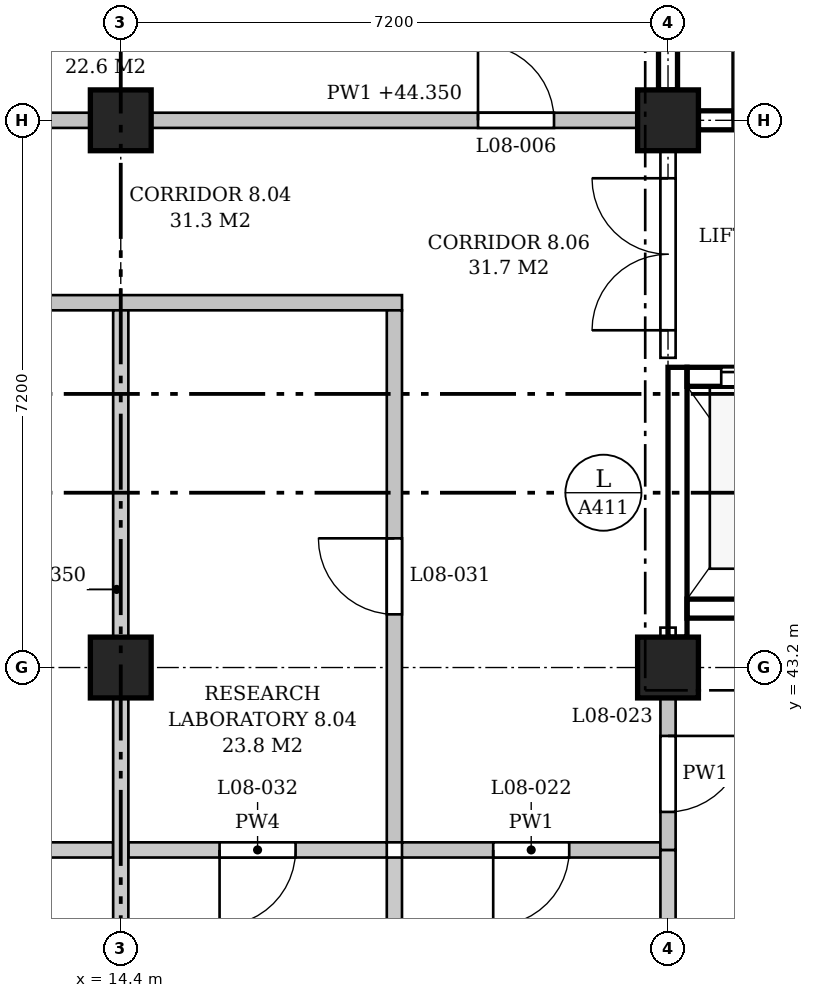
"""IFC4 building model, lengths in metres.
Left out: names, types, materials, properties, quantities, classifications, styles, units other than length and angle.
Written with IfcOpenShell. Run it as: python <this file> out.ifc"""

import sys

from ifc_helpers import new_model, si_unit, direction, frame, frame_2d, origin, origin_2d, place, context, subcontext, project, spatial, polyline, rectangle, outline, extrude, element, fill, save


model = new_model("IFC4")
c1 = context("Model", 3, precision=1e-05, world=origin(), true_north=direction((0.0, 1.0)))
c2 = subcontext(c1, "Body", "Model", "MODEL_VIEW")
j1 = project(units=[si_unit("LENGTHUNIT", "METRE"), si_unit("PLANEANGLEUNIT", "RADIAN")], contexts=[c1])
p1 = place(None, origin())
s1 = spatial("IfcSite", under=j1, at=p1, CompositionType="ELEMENT")
p2 = place(p1, origin())
s2 = spatial("IfcBuilding", under=s1, at=p2, CompositionType="ELEMENT")
p3 = place(p2, frame((0.0, 0.0, 40.8)))
s3 = spatial("IfcBuildingStorey", under=s2, at=p3, CompositionType="ELEMENT", Elevation=40.8)
for number, where, z_axis, x_axis in (
    (1, (14.4, 43.2, 0.0), (0.0, 0.0, 1.0), (1.0, 0.0, 0.0)),
    (2, (14.4, 50.4, 0.0), (0.0, 0.0, 1.0), (1.0, 0.0, 0.0)),
    (3, (21.6, 43.2, 0.0), (0.0, 0.0, 1.0), (1.0, 0.0, 0.0)),
    (4, (21.6, 50.4, 0.0), (0.0, 0.0, 1.0), (1.0, 0.0, 0.0)),
):
    element("IfcColumn", number, at=place(p3, frame(where, z_axis=z_axis, x_axis=x_axis)), inside=s3, PredefinedType="COLUMN", context=c2, shape_type="SweptSolid", body=[
        extrude(rectangle(XDim=0.8, YDim=0.8, at=origin_2d()), origin(), (0.0, 0.0, 1.0), 4.5),
    ])
p4 = place(p3, frame((22.0, 50.4, 0.0), z_axis=(0.0, 0.0, 1.0), x_axis=(1.0, 0.0, 0.0)))
e5 = element("IfcWall", 5, at=p4, inside=s3, PredefinedType="SHEAR", context=c2, shape_type="SweptSolid", body=[
    extrude(rectangle(XDim=6.4, YDim=0.25, at=frame_2d((3.2, 0.0))), origin(), (0.0, 0.0, 1.0), 3.55),
])
p5 = place(p4, frame((0.45, 0.0, 0.0)))
e6 = element("IfcOpeningElement", 6, at=p5, cuts=e5, PredefinedType="OPENING", context=c2, shape_type="SweptSolid", body=[
    extrude(rectangle(XDim=1.1, YDim=2.1, at=frame_2d((0.55, 1.05))), frame((0.0, 0.135, 0.0), z_axis=(0.0, -1.0, 0.0), x_axis=(1.0, 0.0, 0.0)), (0.0, 0.0, 1.0), 0.27),
])
p6 = place(p3, frame((21.6, 50.8, 0.0), z_axis=(0.0, 0.0, 1.0), x_axis=(0.0, 1.0, 0.0)))
e7 = element("IfcWall", 7, at=p6, inside=s3, PredefinedType="SHEAR", context=c2, shape_type="SweptSolid", body=[
    extrude(rectangle(XDim=6.4, YDim=0.25, at=frame_2d((3.2, 0.0))), origin(), (0.0, 0.0, 1.0), 3.55),
])
p7 = place(p3, frame((21.725, 43.6, -0.25), z_axis=(0.0, 0.0, 1.0), x_axis=(0.0, 1.0, 0.0)))
e8 = element("IfcWall", 8, at=p7, inside=s3, PredefinedType="SHEAR", context=c2, shape_type="SweptSolid", body=[
    extrude(rectangle(XDim=3.55, YDim=0.25, at=frame_2d((1.775, 0.0))), origin(), (0.0, 0.0, 1.0), 3.8),
])
p8 = place(p3, frame((21.85, 47.025, -0.25), z_axis=(0.0, 0.0, 1.0), x_axis=(1.0, 0.0, 0.0)))
e9 = element("IfcWall", 9, at=p8, inside=s3, PredefinedType="SHEAR", context=c2, shape_type="SweptSolid", body=[
    extrude(rectangle(XDim=2.0, YDim=0.25, at=frame_2d((1.0, 0.0))), origin(), (0.0, 0.0, 1.0), 4.5),
])
p9 = place(p8, frame((0.45, 0.0, 0.25)))
e10 = element("IfcOpeningElement", 10, at=p9, cuts=e9, PredefinedType="OPENING", context=c2, shape_type="SweptSolid", body=[
    extrude(rectangle(XDim=1.1, YDim=2.1, at=frame_2d((0.55, 1.05))), frame((0.0, 0.135, 0.0), z_axis=(0.0, -1.0, 0.0), x_axis=(1.0, 0.0, 0.0)), (0.0, 0.0, 1.0), 0.27),
])
p10 = place(p3, frame((21.85, 43.975, -0.25), z_axis=(0.0, 0.0, 1.0), x_axis=(1.0, 0.0, 0.0)))
e11 = element("IfcWall", 11, at=p10, inside=s3, PredefinedType="SHEAR", context=c2, shape_type="SweptSolid", body=[
    extrude(rectangle(XDim=2.0, YDim=0.25, at=frame_2d((1.0, 0.0))), origin(), (0.0, 0.0, 1.0), 4.5),
])
p11 = place(p3, frame((7.3, 40.8, 0.0), z_axis=(0.0, 0.0, 1.0), x_axis=(1.0, 0.0, 0.0)))
e12 = element("IfcWall", 12, at=p11, inside=s3, PredefinedType="PARTITIONING", context=c2, shape_type="SweptSolid", body=[
    extrude(outline(polyline([(0.0, 0.0), (7.0, 0.0), (7.0, 3.55), (6.875, 3.55), (6.875, 4.25), (0.125, 4.25), (0.125, 3.55), (0.0, 3.55), (0.0, 0.0)])), frame((0.0, 0.1, 0.0), z_axis=(0.0, -1.0, 0.0), x_axis=(1.0, 0.0, 0.0)), (0.0, 0.0, 1.0), 0.2),
])
p12 = place(p11, frame((1.25, 0.0, 0.0)))
e13 = element("IfcOpeningElement", 13, at=p12, cuts=e12, PredefinedType="OPENING", context=c2, shape_type="SweptSolid", body=[
    extrude(rectangle(XDim=1.0, YDim=2.1, at=frame_2d((0.5, 1.05))), frame((0.0, 0.11, 0.0), z_axis=(0.0, -1.0, 0.0), x_axis=(1.0, 0.0, 0.0)), (0.0, 0.0, 1.0), 0.22),
])
p13 = place(p11, frame((4.75, 0.0, 0.0)))
e14 = element("IfcOpeningElement", 14, at=p13, cuts=e12, PredefinedType="OPENING", context=c2, shape_type="SweptSolid", body=[
    extrude(rectangle(XDim=1.0, YDim=2.1, at=frame_2d((0.5, 1.05))), frame((0.0, 0.11, 0.0), z_axis=(0.0, -1.0, 0.0), x_axis=(1.0, 0.0, 0.0)), (0.0, 0.0, 1.0), 0.22),
])
p14 = place(p3, frame((14.5, 40.8, 0.0), z_axis=(0.0, 0.0, 1.0), x_axis=(1.0, 0.0, 0.0)))
e15 = element("IfcWall", 15, at=p14, inside=s3, PredefinedType="PARTITIONING", context=c2, shape_type="SweptSolid", body=[
    extrude(outline(polyline([(0.0, 0.0), (3.4, 0.0), (3.4, 4.25), (0.125, 4.25), (0.125, 3.55), (0.0, 3.55), (0.0, 0.0)])), frame((0.0, 0.1, 0.0), z_axis=(0.0, -1.0, 0.0), x_axis=(1.0, 0.0, 0.0)), (0.0, 0.0, 1.0), 0.2),
])
p15 = place(p14, frame((1.2, 0.0, 0.0)))
e16 = element("IfcOpeningElement", 16, at=p15, cuts=e15, PredefinedType="OPENING", context=c2, shape_type="SweptSolid", body=[
    extrude(rectangle(XDim=1.0, YDim=2.1, at=frame_2d((0.5, 1.05))), frame((0.0, 0.11, 0.0), z_axis=(0.0, -1.0, 0.0), x_axis=(1.0, 0.0, 0.0)), (0.0, 0.0, 1.0), 0.22),
])
p16 = place(p3, frame((18.1, 40.8, 0.0), z_axis=(0.0, 0.0, 1.0), x_axis=(1.0, 0.0, 0.0)))
e17 = element("IfcWall", 17, at=p16, inside=s3, PredefinedType="PARTITIONING", context=c2, shape_type="SweptSolid", body=[
    extrude(outline(polyline([(0.0, 0.0), (3.4, 0.0), (3.4, 3.55), (3.275, 3.55), (3.275, 4.25), (0.0, 4.25), (0.0, 0.0)])), frame((0.0, 0.1, 0.0), z_axis=(0.0, -1.0, 0.0), x_axis=(1.0, 0.0, 0.0)), (0.0, 0.0, 1.0), 0.2),
])
p17 = place(p16, frame((1.2, 0.0, 0.0)))
e18 = element("IfcOpeningElement", 18, at=p17, cuts=e17, PredefinedType="OPENING", context=c2, shape_type="SweptSolid", body=[
    extrude(rectangle(XDim=1.0, YDim=2.1, at=frame_2d((0.5, 1.05))), frame((0.0, 0.11, 0.0), z_axis=(0.0, -1.0, 0.0), x_axis=(1.0, 0.0, 0.0)), (0.0, 0.0, 1.0), 0.22),
])
p18 = place(p3, frame((3.5, 48.0, 0.0), z_axis=(0.0, 0.0, 1.0), x_axis=(1.0, 0.0, 0.0)))
e19 = element("IfcWall", 19, at=p18, inside=s3, PredefinedType="PARTITIONING", context=c2, shape_type="SweptSolid", body=[
    extrude(outline(polyline([(0.0, 0.0), (14.6, 0.0), (14.6, 4.25), (11.125, 4.25), (11.125, 3.55), (10.675, 3.55), (10.675, 4.25), (3.925, 4.25), (3.925, 3.55), (3.475, 3.55), (3.475, 4.25), (0.0, 4.25), (0.0, 0.0)])), frame((0.0, 0.1, 0.0), z_axis=(0.0, -1.0, 0.0), x_axis=(1.0, 0.0, 0.0)), (0.0, 0.0, 1.0), 0.2),
])
p19 = place(p18, frame((1.4, 0.0, 0.0)))
e20 = element("IfcOpeningElement", 20, at=p19, cuts=e19, PredefinedType="OPENING", context=c2, shape_type="SweptSolid", body=[
    extrude(rectangle(XDim=1.0, YDim=2.1, at=frame_2d((0.5, 1.05))), frame((0.0, 0.11, 0.0), z_axis=(0.0, -1.0, 0.0), x_axis=(1.0, 0.0, 0.0)), (0.0, 0.0, 1.0), 0.22),
])
p20 = place(p18, frame((6.8, 0.0, 0.0)))
e21 = element("IfcOpeningElement", 21, at=p20, cuts=e19, PredefinedType="OPENING", context=c2, shape_type="SweptSolid", body=[
    extrude(rectangle(XDim=1.0, YDim=2.1, at=frame_2d((0.5, 1.05))), frame((0.0, 0.11, 0.0), z_axis=(0.0, -1.0, 0.0), x_axis=(1.0, 0.0, 0.0)), (0.0, 0.0, 1.0), 0.22),
])
p21 = place(p3, frame((7.6, 50.4, 0.0), z_axis=(0.0, 0.0, 1.0), x_axis=(1.0, 0.0, 0.0)))
e22 = element("IfcWall", 22, at=p21, inside=s3, PredefinedType="PARTITIONING", context=c2, shape_type="SweptSolid", body=[
    extrude(rectangle(XDim=6.4, YDim=0.2, at=frame_2d((3.2, 0.0))), origin(), (0.0, 0.0, 1.0), 3.55),
])
p22 = place(p21, frame((2.7, 0.0, 0.0)))
e23 = element("IfcOpeningElement", 23, at=p22, cuts=e22, PredefinedType="OPENING", context=c2, shape_type="SweptSolid", body=[
    extrude(rectangle(XDim=1.0, YDim=2.1, at=frame_2d((0.5, 1.05))), frame((0.0, 0.11, 0.0), z_axis=(0.0, -1.0, 0.0), x_axis=(1.0, 0.0, 0.0)), (0.0, 0.0, 1.0), 0.22),
])
p23 = place(p3, frame((14.8, 50.4, 0.0), z_axis=(0.0, 0.0, 1.0), x_axis=(1.0, 0.0, 0.0)))
e24 = element("IfcWall", 24, at=p23, inside=s3, PredefinedType="PARTITIONING", context=c2, shape_type="SweptSolid", body=[
    extrude(rectangle(XDim=6.4, YDim=0.2, at=frame_2d((3.2, 0.0))), origin(), (0.0, 0.0, 1.0), 3.55),
])
p24 = place(p23, frame((4.3, 0.0, 0.0)))
e25 = element("IfcOpeningElement", 25, at=p24, cuts=e24, PredefinedType="OPENING", context=c2, shape_type="SweptSolid", body=[
    extrude(rectangle(XDim=1.0, YDim=2.1, at=frame_2d((0.5, 1.05))), frame((0.0, 0.11, 0.0), z_axis=(0.0, -1.0, 0.0), x_axis=(1.0, 0.0, 0.0)), (0.0, 0.0, 1.0), 0.22),
])
p25 = place(p3, frame((14.4, 36.4, 0.0), z_axis=(0.0, 0.0, 1.0), x_axis=(0.0, 1.0, 0.0)))
e26 = element("IfcWall", 26, at=p25, inside=s3, PredefinedType="PARTITIONING", context=c2, shape_type="SweptSolid", body=[
    extrude(rectangle(XDim=6.4, YDim=0.2, at=frame_2d((3.2, 0.0))), origin(), (0.0, 0.0, 1.0), 3.55),
])
p26 = place(p3, frame((14.4, 43.6, 0.0), z_axis=(0.0, 0.0, 1.0), x_axis=(0.0, 1.0, 0.0)))
e27 = element("IfcWall", 27, at=p26, inside=s3, PredefinedType="PARTITIONING", context=c2, shape_type="SweptSolid", body=[
    extrude(rectangle(XDim=4.3, YDim=0.2, at=frame_2d((2.15, 0.0))), origin(), (0.0, 0.0, 1.0), 3.55),
])
p27 = place(p3, frame((18.0, 36.15, 0.0), z_axis=(0.0, 0.0, 1.0), x_axis=(0.0, 1.0, 0.0)))
e28 = element("IfcWall", 28, at=p27, inside=s3, PredefinedType="PARTITIONING", context=c2, shape_type="SweptSolid", body=[
    extrude(outline(polyline([(0.0, 0.0), (4.55, 0.0), (4.55, 4.25), (0.05, 4.25), (0.05, 3.65), (0.0, 3.65), (0.0, 0.0)])), frame((0.0, 0.1, 0.0), z_axis=(0.0, -1.0, 0.0), x_axis=(1.0, 0.0, 0.0)), (0.0, 0.0, 1.0), 0.2),
])
p28 = place(p3, frame((18.0, 40.9, 0.0), z_axis=(0.0, 0.0, 1.0), x_axis=(0.0, 1.0, 0.0)))
e29 = element("IfcWall", 29, at=p28, inside=s3, PredefinedType="PARTITIONING", context=c2, shape_type="SweptSolid", body=[
    extrude(outline(polyline([(0.0, 0.0), (7.0, 0.0), (7.0, 4.25), (2.525, 4.25), (2.525, 3.55), (2.075, 3.55), (2.075, 4.25), (0.0, 4.25), (0.0, 0.0)])), frame((0.0, 0.1, 0.0), z_axis=(0.0, -1.0, 0.0), x_axis=(1.0, 0.0, 0.0)), (0.0, 0.0, 1.0), 0.2),
])
p29 = place(p28, frame((3.0, 0.0, 0.0)))
e30 = element("IfcOpeningElement", 30, at=p29, cuts=e29, PredefinedType="OPENING", context=c2, shape_type="SweptSolid", body=[
    extrude(rectangle(XDim=1.0, YDim=2.1, at=frame_2d((0.5, 1.05))), frame((0.0, 0.11, 0.0), z_axis=(0.0, -1.0, 0.0), x_axis=(1.0, 0.0, 0.0)), (0.0, 0.0, 1.0), 0.22),
])
p30 = place(p3, frame((21.6, 36.4, 0.0), z_axis=(0.0, 0.0, 1.0), x_axis=(0.0, 1.0, 0.0)))
e31 = element("IfcWall", 31, at=p30, inside=s3, PredefinedType="PARTITIONING", context=c2, shape_type="SweptSolid", body=[
    extrude(rectangle(XDim=4.4, YDim=0.2, at=frame_2d((2.2, 0.0))), origin(), (0.0, 0.0, 1.0), 3.55),
])
p31 = place(p3, frame((21.6, 40.8, 0.0), z_axis=(0.0, 0.0, 1.0), x_axis=(0.0, 1.0, 0.0)))
e32 = element("IfcWall", 32, at=p31, inside=s3, PredefinedType="PARTITIONING", context=c2, shape_type="SweptSolid", body=[
    extrude(rectangle(XDim=2.0, YDim=0.2, at=frame_2d((1.0, 0.0))), origin(), (0.0, 0.0, 1.0), 3.55),
])
p32 = place(p31, frame((0.5, 0.0, 0.0)))
e33 = element("IfcOpeningElement", 33, at=p32, cuts=e32, PredefinedType="OPENING", context=c2, shape_type="SweptSolid", body=[
    extrude(rectangle(XDim=1.0, YDim=2.1, at=frame_2d((0.5, 1.05))), frame((0.0, 0.11, 0.0), z_axis=(0.0, -1.0, 0.0), x_axis=(1.0, 0.0, 0.0)), (0.0, 0.0, 1.0), 0.22),
])
p33 = place(p3, frame((21.6, 43.6, 0.0), z_axis=(0.0, 0.0, 1.0), x_axis=(0.0, 1.0, 0.0)))
e34 = element("IfcWall", 34, at=p33, inside=s3, PredefinedType="PARTITIONING", context=c2, shape_type="SweptSolid", body=[
    extrude(rectangle(XDim=0.125, YDim=0.2, at=frame_2d((0.062, 0.0))), origin(), (0.0, 0.0, 1.0), 3.55),
])
p34 = place(p3, frame((21.6, 47.275, 0.0), z_axis=(0.0, 0.0, 1.0), x_axis=(0.0, 1.0, 0.0)))
e35 = element("IfcWall", 35, at=p34, inside=s3, PredefinedType="PARTITIONING", context=c2, shape_type="SweptSolid", body=[
    extrude(rectangle(XDim=2.725, YDim=0.2, at=frame_2d((1.363, 0.0))), origin(), (0.0, 0.0, 1.0), 3.55),
])
p35 = place(p34, frame((0.363, 0.0, 0.0)))
e36 = element("IfcOpeningElement", 36, at=p35, cuts=e35, PredefinedType="OPENING", context=c2, shape_type="SweptSolid", body=[
    extrude(rectangle(XDim=2.0, YDim=2.4, at=frame_2d((1.0, 1.2))), frame((0.0, 0.11, 0.0), z_axis=(0.0, -1.0, 0.0), x_axis=(1.0, 0.0, 0.0)), (0.0, 0.0, 1.0), 0.22),
])
p36 = place(p5, origin())
e37 = element("IfcDoor", 37, at=p36, inside=s3, OperationType="SINGLE_SWING_LEFT", PredefinedType="DOOR", context=c2, shape_type="SweptSolid", body=[
    extrude(rectangle(XDim=1.1, YDim=2.1, at=frame_2d((0.55, 1.05))), frame((0.0, 0.025, 0.0), z_axis=(0.0, -1.0, 0.0), x_axis=(1.0, 0.0, 0.0)), (0.0, 0.0, 1.0), 0.05),
])
fill(e6, e37)
p37 = place(p9, origin())
e38 = element("IfcDoor", 38, at=p37, inside=s3, OperationType="SLIDING_TO_LEFT", PredefinedType="DOOR", context=c2, shape_type="SweptSolid", body=[
    extrude(rectangle(XDim=1.1, YDim=2.1, at=frame_2d((0.55, 1.05))), frame((0.0, 0.025, 0.0), z_axis=(0.0, -1.0, 0.0), x_axis=(1.0, 0.0, 0.0)), (0.0, 0.0, 1.0), 0.05),
])
fill(e10, e38)
p38 = place(p35, origin())
e39 = element("IfcDoor", 39, at=p38, inside=s3, OperationType="DOUBLE_DOOR_SINGLE_SWING", PredefinedType="DOOR", context=c2, shape_type="SweptSolid", body=[
    extrude(rectangle(XDim=2.0, YDim=2.4, at=frame_2d((1.0, 1.2))), frame((0.0, 0.025, 0.0), z_axis=(0.0, -1.0, 0.0), x_axis=(1.0, 0.0, 0.0)), (0.0, 0.0, 1.0), 0.05),
])
fill(e36, e39)
p39 = place(p24, origin())
e40 = element("IfcDoor", 40, at=p39, inside=s3, OperationType="SINGLE_SWING_LEFT", PredefinedType="DOOR", context=c2, shape_type="SweptSolid", body=[
    extrude(rectangle(XDim=1.0, YDim=2.1, at=frame_2d((0.5, 1.05))), frame((0.0, 0.025, 0.0), z_axis=(0.0, -1.0, 0.0), x_axis=(1.0, 0.0, 0.0)), (0.0, 0.0, 1.0), 0.05),
])
fill(e25, e40)
p40 = place(p17, frame((1.0, 0.0, 0.0), z_axis=(0.0, 0.0, 1.0), x_axis=(-1.0, 0.0, 0.0)))
e41 = element("IfcDoor", 41, at=p40, inside=s3, OperationType="SINGLE_SWING_RIGHT", PredefinedType="DOOR", context=c2, shape_type="SweptSolid", body=[
    extrude(rectangle(XDim=1.0, YDim=2.1, at=frame_2d((0.5, 1.05))), frame((0.0, 0.025, 0.0), z_axis=(0.0, -1.0, 0.0), x_axis=(1.0, 0.0, 0.0)), (0.0, 0.0, 1.0), 0.05),
])
fill(e18, e41)
p41 = place(p32, frame((1.0, 0.0, 0.0), z_axis=(0.0, 0.0, 1.0), x_axis=(-1.0, 0.0, 0.0)))
e42 = element("IfcDoor", 42, at=p41, inside=s3, OperationType="SINGLE_SWING_LEFT", PredefinedType="DOOR", context=c2, shape_type="SweptSolid", body=[
    extrude(rectangle(XDim=1.0, YDim=2.1, at=frame_2d((0.5, 1.05))), frame((0.0, 0.025, 0.0), z_axis=(0.0, -1.0, 0.0), x_axis=(1.0, 0.0, 0.0)), (0.0, 0.0, 1.0), 0.05),
])
fill(e33, e42)
p42 = place(p29, origin())
e43 = element("IfcDoor", 43, at=p42, inside=s3, OperationType="SINGLE_SWING_RIGHT", PredefinedType="DOOR", context=c2, shape_type="SweptSolid", body=[
    extrude(rectangle(XDim=1.0, YDim=2.1, at=frame_2d((0.5, 1.05))), frame((0.0, 0.025, 0.0), z_axis=(0.0, -1.0, 0.0), x_axis=(1.0, 0.0, 0.0)), (0.0, 0.0, 1.0), 0.05),
])
fill(e30, e43)
p43 = place(p15, frame((1.0, 0.0, 0.0), z_axis=(0.0, 0.0, 1.0), x_axis=(-1.0, 0.0, 0.0)))
e44 = element("IfcDoor", 44, at=p43, inside=s3, OperationType="SINGLE_SWING_RIGHT", PredefinedType="DOOR", context=c2, shape_type="SweptSolid", body=[
    extrude(rectangle(XDim=1.0, YDim=2.1, at=frame_2d((0.5, 1.05))), frame((0.0, 0.025, 0.0), z_axis=(0.0, -1.0, 0.0), x_axis=(1.0, 0.0, 0.0)), (0.0, 0.0, 1.0), 0.05),
])
fill(e16, e44)
save(model, sys.argv[1])
